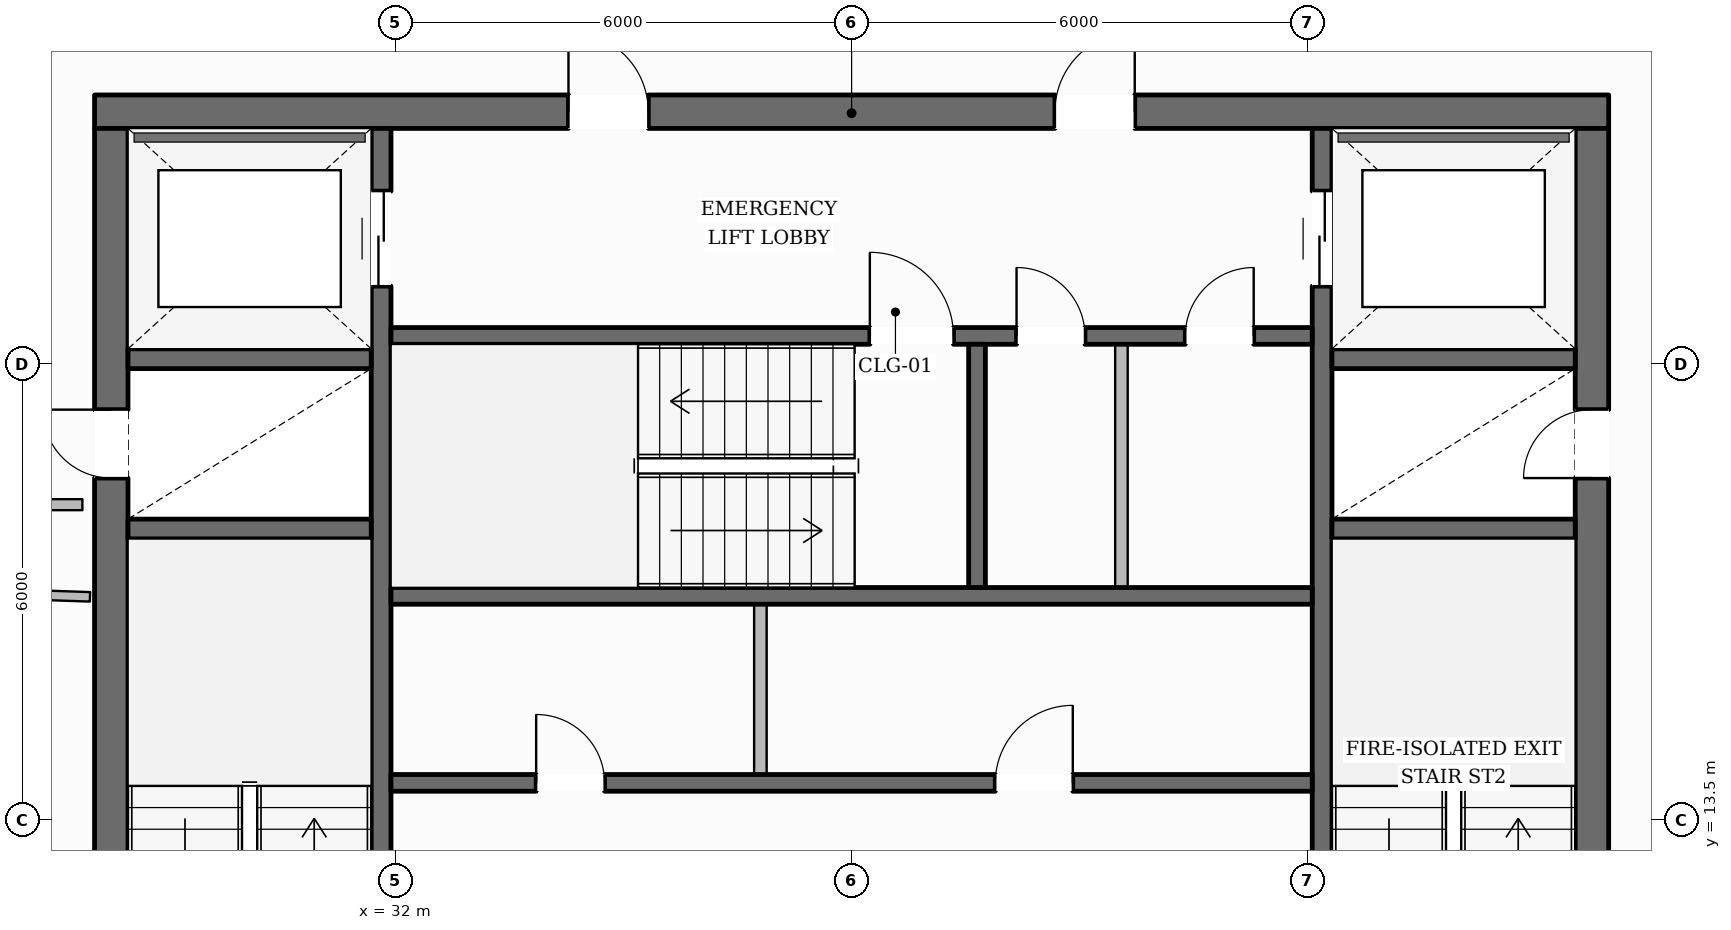
"""IFC4 building model, lengths in metres.
Left out: names, types, materials, properties, quantities, classifications, styles, units other than length and angle.
Written with IfcOpenShell. Run it as: python <this file> out.ifc"""

import sys

from ifc_helpers import new_model, si_unit, direction, frame, frame_2d, origin, place, context, subcontext, project, spatial, rectangle, extrude, element, fill, save


model = new_model("IFC4")
c1 = context("Model", 3, precision=1e-05, world=origin(), true_north=direction((0.0, 1.0)))
c2 = subcontext(c1, "Body", "Model", "MODEL_VIEW")
j1 = project(units=[si_unit("LENGTHUNIT", "METRE"), si_unit("PLANEANGLEUNIT", "RADIAN")], contexts=[c1])
p1 = place(None, origin())
s1 = spatial("IfcSite", under=j1, at=p1, CompositionType="ELEMENT")
p2 = place(p1, origin())
s2 = spatial("IfcBuilding", under=s1, at=p2, CompositionType="ELEMENT")
p3 = place(p2, frame((0.0, 0.0, 203.5)))
s3 = spatial("IfcBuildingStorey", under=s2, at=p3, CompositionType="ELEMENT", Elevation=203.5)
p4 = place(p3, frame((28.04, 22.82, 0.0), z_axis=(0.0, 0.0, 1.0), x_axis=(1.0, 0.0, 0.0)))
e1 = element("IfcWall", 1, at=p4, inside=s3, PredefinedType="SOLIDWALL", context=c2, shape_type="SweptSolid", body=[
    extrude(rectangle(XDim=19.92, YDim=0.44, at=frame_2d((9.96, 0.0))), origin(), (0.0, 0.0, 1.0), 3.6),
])
p5 = place(p4, frame((6.235, 0.0, 0.0)))
e2 = element("IfcOpeningElement", 2, at=p5, cuts=e1, PredefinedType="OPENING", context=c2, shape_type="SweptSolid", body=[
    extrude(rectangle(XDim=1.05, YDim=2.15, at=frame_2d((0.525, 1.075))), frame((0.0, 0.23, 0.0), z_axis=(0.0, -1.0, 0.0), x_axis=(1.0, 0.0, 0.0)), (0.0, 0.0, 1.0), 0.46),
])
p6 = place(p4, frame((12.635, 0.0, 0.0)))
e3 = element("IfcOpeningElement", 3, at=p6, cuts=e1, PredefinedType="OPENING", context=c2, shape_type="SweptSolid", body=[
    extrude(rectangle(XDim=1.05, YDim=2.15, at=frame_2d((0.525, 1.075))), frame((0.0, 0.23, 0.0), z_axis=(0.0, -1.0, 0.0), x_axis=(1.0, 0.0, 0.0)), (0.0, 0.0, 1.0), 0.46),
])
p7 = place(p3, frame((28.26, 9.6, 0.0), z_axis=(0.0, 0.0, 1.0), x_axis=(0.0, 1.0, 0.0)))
e4 = element("IfcWall", 4, at=p7, inside=s3, PredefinedType="SOLIDWALL", context=c2, shape_type="SweptSolid", body=[
    extrude(rectangle(XDim=13.0, YDim=0.44, at=frame_2d((6.5, 0.0))), origin(), (0.0, 0.0, 1.0), 3.6),
])
p8 = place(p7, frame((0.2, 0.0, 0.0)))
e5 = element("IfcOpeningElement", 5, at=p8, cuts=e4, PredefinedType="OPENING", context=c2, shape_type="SweptSolid", body=[
    extrude(rectangle(XDim=1.1, YDim=2.15, at=frame_2d((0.55, 1.075))), frame((0.0, 0.23, 0.0), z_axis=(0.0, -1.0, 0.0), x_axis=(1.0, 0.0, 0.0)), (0.0, 0.0, 1.0), 0.46),
])
p9 = place(p7, frame((8.4, 0.0, 0.0)))
e6 = element("IfcOpeningElement", 6, at=p9, cuts=e4, PredefinedType="OPENING", context=c2, shape_type="SweptSolid", body=[
    extrude(rectangle(XDim=0.9, YDim=2.1, at=frame_2d((0.45, 1.05))), frame((0.0, 0.23, 0.0), z_axis=(0.0, -1.0, 0.0), x_axis=(1.0, 0.0, 0.0)), (0.0, 0.0, 1.0), 0.46),
])
p10 = place(p3, frame((47.74, 9.6, 0.0), z_axis=(0.0, 0.0, 1.0), x_axis=(0.0, 1.0, 0.0)))
e7 = element("IfcWall", 7, at=p10, inside=s3, PredefinedType="SOLIDWALL", context=c2, shape_type="SweptSolid", body=[
    extrude(rectangle(XDim=13.0, YDim=0.44, at=frame_2d((6.5, 0.0))), origin(), (0.0, 0.0, 1.0), 3.6),
])
p11 = place(p10, frame((0.2, 0.0, 0.0)))
e8 = element("IfcOpeningElement", 8, at=p11, cuts=e7, PredefinedType="OPENING", context=c2, shape_type="SweptSolid", body=[
    extrude(rectangle(XDim=1.1, YDim=2.15, at=frame_2d((0.55, 1.075))), frame((0.0, 0.23, 0.0), z_axis=(0.0, -1.0, 0.0), x_axis=(1.0, 0.0, 0.0)), (0.0, 0.0, 1.0), 0.46),
])
p12 = place(p10, frame((8.4, 0.0, 0.0)))
e9 = element("IfcOpeningElement", 9, at=p12, cuts=e7, PredefinedType="OPENING", context=c2, shape_type="SweptSolid", body=[
    extrude(rectangle(XDim=0.9, YDim=2.1, at=frame_2d((0.45, 1.05))), frame((0.0, 0.23, 0.0), z_axis=(0.0, -1.0, 0.0), x_axis=(1.0, 0.0, 0.0)), (0.0, 0.0, 1.0), 0.46),
])
p13 = place(p3, frame((31.81, 9.6, 0.0), z_axis=(0.0, 0.0, 1.0), x_axis=(0.0, 1.0, 0.0)))
e10 = element("IfcWall", 10, at=p13, inside=s3, PredefinedType="SHEAR", context=c2, shape_type="SweptSolid", body=[
    extrude(rectangle(XDim=13.0, YDim=0.26, at=frame_2d((6.5, 0.0))), origin(), (0.0, 0.0, 1.0), 3.6),
])
p14 = place(p13, frame((10.925, 0.0, 0.0)))
e11 = element("IfcOpeningElement", 11, at=p14, cuts=e10, PredefinedType="OPENING", context=c2, shape_type="SweptSolid", body=[
    extrude(rectangle(XDim=1.25, YDim=2.25, at=frame_2d((0.625, 1.125))), frame((0.0, 0.14, 0.0), z_axis=(0.0, -1.0, 0.0), x_axis=(1.0, 0.0, 0.0)), (0.0, 0.0, 1.0), 0.28),
])
p15 = place(p3, frame((44.19, 9.6, 0.0), z_axis=(0.0, 0.0, 1.0), x_axis=(0.0, 1.0, 0.0)))
e12 = element("IfcWall", 12, at=p15, inside=s3, PredefinedType="SHEAR", context=c2, shape_type="SweptSolid", body=[
    extrude(rectangle(XDim=13.0, YDim=0.26, at=frame_2d((6.5, 0.0))), origin(), (0.0, 0.0, 1.0), 3.6),
])
p16 = place(p15, frame((10.925, 0.0, 0.0)))
e13 = element("IfcOpeningElement", 13, at=p16, cuts=e12, PredefinedType="OPENING", context=c2, shape_type="SweptSolid", body=[
    extrude(rectangle(XDim=1.25, YDim=2.25, at=frame_2d((0.625, 1.125))), frame((0.0, 0.14, 0.0), z_axis=(0.0, -1.0, 0.0), x_axis=(1.0, 0.0, 0.0)), (0.0, 0.0, 1.0), 0.28),
])
for number, where, z_axis, x_axis in (
    (14, (28.48, 17.33, 0.0), (0.0, 0.0, 1.0), (1.0, 0.0, 0.0)),
    (15, (28.48, 19.57, 0.0), (0.0, 0.0, 1.0), (1.0, 0.0, 0.0)),
    (16, (44.32, 17.33, 0.0), (0.0, 0.0, 1.0), (1.0, 0.0, 0.0)),
    (17, (44.32, 19.57, 0.0), (0.0, 0.0, 1.0), (1.0, 0.0, 0.0)),
):
    element("IfcWall", number, at=place(p3, frame(where, z_axis=z_axis, x_axis=x_axis)), inside=s3, PredefinedType="SHEAR", context=c2, shape_type="SweptSolid", body=[
        extrude(rectangle(XDim=3.2, YDim=0.26, at=frame_2d((1.6, 0.0))), origin(), (0.0, 0.0, 1.0), 3.6),
    ])
p17 = place(p3, frame((31.94, 19.87, 0.0), z_axis=(0.0, 0.0, 1.0), x_axis=(1.0, 0.0, 0.0)))
e18 = element("IfcWall", 18, at=p17, inside=s3, PredefinedType="SOLIDWALL", context=c2, shape_type="SweptSolid", body=[
    extrude(rectangle(XDim=12.12, YDim=0.22, at=frame_2d((6.06, 0.0))), origin(), (0.0, 0.0, 1.0), 3.6),
])
p18 = place(p17, frame((6.3, 0.0, 0.0)))
e19 = element("IfcOpeningElement", 19, at=p18, cuts=e18, PredefinedType="OPENING", context=c2, shape_type="SweptSolid", body=[
    extrude(rectangle(XDim=1.1, YDim=2.15, at=frame_2d((0.55, 1.075))), frame((0.0, 0.12, 0.0), z_axis=(0.0, -1.0, 0.0), x_axis=(1.0, 0.0, 0.0)), (0.0, 0.0, 1.0), 0.24),
])
p19 = place(p17, frame((8.23, 0.0, 0.0)))
e20 = element("IfcOpeningElement", 20, at=p19, cuts=e18, PredefinedType="OPENING", context=c2, shape_type="SweptSolid", body=[
    extrude(rectangle(XDim=0.9, YDim=2.1, at=frame_2d((0.45, 1.05))), frame((0.0, 0.12, 0.0), z_axis=(0.0, -1.0, 0.0), x_axis=(1.0, 0.0, 0.0)), (0.0, 0.0, 1.0), 0.24),
])
p20 = place(p17, frame((10.45, 0.0, 0.0)))
e21 = element("IfcOpeningElement", 21, at=p20, cuts=e18, PredefinedType="OPENING", context=c2, shape_type="SweptSolid", body=[
    extrude(rectangle(XDim=0.9, YDim=2.1, at=frame_2d((0.45, 1.05))), frame((0.0, 0.12, 0.0), z_axis=(0.0, -1.0, 0.0), x_axis=(1.0, 0.0, 0.0)), (0.0, 0.0, 1.0), 0.24),
])
p21 = place(p3, frame((31.94, 16.45, 0.0), z_axis=(0.0, 0.0, 1.0), x_axis=(1.0, 0.0, 0.0)))
e22 = element("IfcWall", 22, at=p21, inside=s3, PredefinedType="SOLIDWALL", context=c2, shape_type="SweptSolid", body=[
    extrude(rectangle(XDim=12.12, YDim=0.22, at=frame_2d((6.06, 0.0))), origin(), (0.0, 0.0, 1.0), 3.6),
])
p22 = place(p3, frame((39.65, 16.56, 0.0), z_axis=(0.0, 0.0, 1.0), x_axis=(0.0, 1.0, 0.0)))
e23 = element("IfcWall", 23, at=p22, inside=s3, PredefinedType="SOLIDWALL", context=c2, shape_type="SweptSolid", body=[
    extrude(rectangle(XDim=3.2, YDim=0.22, at=frame_2d((1.6, 0.0))), origin(), (0.0, 0.0, 1.0), 3.6),
])
p23 = place(p3, frame((31.94, 13.99, 0.0), z_axis=(0.0, 0.0, 1.0), x_axis=(1.0, 0.0, 0.0)))
e24 = element("IfcWall", 24, at=p23, inside=s3, PredefinedType="SOLIDWALL", context=c2, shape_type="SweptSolid", body=[
    extrude(rectangle(XDim=12.12, YDim=0.22, at=frame_2d((6.06, 0.0))), origin(), (0.0, 0.0, 1.0), 3.6),
])
p24 = place(p23, frame((1.91, 0.0, 0.0)))
e25 = element("IfcOpeningElement", 25, at=p24, cuts=e24, PredefinedType="OPENING", context=c2, shape_type="SweptSolid", body=[
    extrude(rectangle(XDim=0.9, YDim=2.1, at=frame_2d((0.45, 1.05))), frame((0.0, 0.12, 0.0), z_axis=(0.0, -1.0, 0.0), x_axis=(1.0, 0.0, 0.0)), (0.0, 0.0, 1.0), 0.24),
])
p25 = place(p23, frame((7.95, 0.0, 0.0)))
e26 = element("IfcOpeningElement", 26, at=p25, cuts=e24, PredefinedType="OPENING", context=c2, shape_type="SweptSolid", body=[
    extrude(rectangle(XDim=1.02, YDim=2.15, at=frame_2d((0.51, 1.075))), frame((0.0, 0.12, 0.0), z_axis=(0.0, -1.0, 0.0), x_axis=(1.0, 0.0, 0.0)), (0.0, 0.0, 1.0), 0.24),
])
p26 = place(p3, frame((14.405, 11.157, 0.0), z_axis=(0.0, 0.0, 1.0), x_axis=(0.507147779291, 0.861859112593, 0.0)))
e27 = element("IfcWall", 27, at=p26, inside=s3, PredefinedType="STANDARD", context=c2, shape_type="SweptSolid", body=[
    extrude(rectangle(XDim=38.111, YDim=0.35, at=frame_2d((19.056, 0.0))), origin(), (0.0, 0.0, 1.0), 3.132),
])
p27 = place(p26, frame((33.816, 0.0, 0.65)))
e28 = element("IfcOpeningElement", 28, at=p27, cuts=e27, PredefinedType="OPENING", context=c2, shape_type="SweptSolid", body=[
    extrude(rectangle(XDim=1.45, YDim=1.75, at=frame_2d((0.725, 0.875))), frame((0.0, 0.185, 0.0), z_axis=(0.0, -1.0, 0.0), x_axis=(1.0, 0.0, 0.0)), (0.0, 0.0, 1.0), 0.37),
])
p28 = place(p26, frame((27.623, 0.0, 0.65)))
e29 = element("IfcOpeningElement", 29, at=p28, cuts=e27, PredefinedType="OPENING", context=c2, shape_type="SweptSolid", body=[
    extrude(rectangle(XDim=1.45, YDim=1.75, at=frame_2d((0.725, 0.875))), frame((0.0, 0.185, 0.0), z_axis=(0.0, -1.0, 0.0), x_axis=(1.0, 0.0, 0.0)), (0.0, 0.0, 1.0), 0.37),
])
p29 = place(p26, frame((15.239, 0.0, 0.65)))
e30 = element("IfcOpeningElement", 30, at=p29, cuts=e27, PredefinedType="OPENING", context=c2, shape_type="SweptSolid", body=[
    extrude(rectangle(XDim=1.45, YDim=1.75, at=frame_2d((0.725, 0.875))), frame((0.0, 0.185, 0.0), z_axis=(0.0, -1.0, 0.0), x_axis=(1.0, 0.0, 0.0)), (0.0, 0.0, 1.0), 0.37),
])
p30 = place(p26, frame((9.046, 0.0, 0.65)))
e31 = element("IfcOpeningElement", 31, at=p30, cuts=e27, PredefinedType="OPENING", context=c2, shape_type="SweptSolid", body=[
    extrude(rectangle(XDim=1.45, YDim=1.75, at=frame_2d((0.725, 0.875))), frame((0.0, 0.185, 0.0), z_axis=(0.0, -1.0, 0.0), x_axis=(1.0, 0.0, 0.0)), (0.0, 0.0, 1.0), 0.37),
])
p31 = place(p26, frame((2.854, 0.0, 0.65)))
e32 = element("IfcOpeningElement", 32, at=p31, cuts=e27, PredefinedType="OPENING", context=c2, shape_type="SweptSolid", body=[
    extrude(rectangle(XDim=1.45, YDim=1.75, at=frame_2d((0.725, 0.875))), frame((0.0, 0.185, 0.0), z_axis=(0.0, -1.0, 0.0), x_axis=(1.0, 0.0, 0.0)), (0.0, 0.0, 1.0), 0.37),
])
p32 = place(p3, frame((42.267, 44.004, 0.0), z_axis=(0.0, 0.0, 1.0), x_axis=(0.507147779291, -0.861859112593, 0.0)))
e33 = element("IfcWall", 33, at=p32, inside=s3, PredefinedType="STANDARD", context=c2, shape_type="SweptSolid", body=[
    extrude(rectangle(XDim=38.111, YDim=0.35, at=frame_2d((19.056, 0.0))), origin(), (0.0, 0.0, 1.0), 3.132),
])
p33 = place(p32, frame((33.808, 0.0, 0.65)))
e34 = element("IfcOpeningElement", 34, at=p33, cuts=e33, PredefinedType="OPENING", context=c2, shape_type="SweptSolid", body=[
    extrude(rectangle(XDim=1.45, YDim=1.75, at=frame_2d((0.725, 0.875))), frame((0.0, 0.185, 0.0), z_axis=(0.0, -1.0, 0.0), x_axis=(1.0, 0.0, 0.0)), (0.0, 0.0, 1.0), 0.37),
])
p34 = place(p32, frame((27.615, 0.0, 0.65)))
e35 = element("IfcOpeningElement", 35, at=p34, cuts=e33, PredefinedType="OPENING", context=c2, shape_type="SweptSolid", body=[
    extrude(rectangle(XDim=1.45, YDim=1.75, at=frame_2d((0.725, 0.875))), frame((0.0, 0.185, 0.0), z_axis=(0.0, -1.0, 0.0), x_axis=(1.0, 0.0, 0.0)), (0.0, 0.0, 1.0), 0.37),
])
p35 = place(p32, frame((15.231, 0.0, 0.65)))
e36 = element("IfcOpeningElement", 36, at=p35, cuts=e33, PredefinedType="OPENING", context=c2, shape_type="SweptSolid", body=[
    extrude(rectangle(XDim=1.45, YDim=1.75, at=frame_2d((0.725, 0.875))), frame((0.0, 0.185, 0.0), z_axis=(0.0, -1.0, 0.0), x_axis=(1.0, 0.0, 0.0)), (0.0, 0.0, 1.0), 0.37),
])
p36 = place(p32, frame((9.038, 0.0, 0.65)))
e37 = element("IfcOpeningElement", 37, at=p36, cuts=e33, PredefinedType="OPENING", context=c2, shape_type="SweptSolid", body=[
    extrude(rectangle(XDim=1.45, YDim=1.75, at=frame_2d((0.725, 0.875))), frame((0.0, 0.185, 0.0), z_axis=(0.0, -1.0, 0.0), x_axis=(1.0, 0.0, 0.0)), (0.0, 0.0, 1.0), 0.37),
])
p37 = place(p32, frame((2.846, 0.0, 0.65)))
e38 = element("IfcOpeningElement", 38, at=p37, cuts=e33, PredefinedType="OPENING", context=c2, shape_type="SweptSolid", body=[
    extrude(rectangle(XDim=1.45, YDim=1.75, at=frame_2d((0.725, 0.875))), frame((0.0, 0.185, 0.0), z_axis=(0.0, -1.0, 0.0), x_axis=(1.0, 0.0, 0.0)), (0.0, 0.0, 1.0), 0.37),
])
p38 = place(p3, frame((36.8, 14.1, 0.0), z_axis=(0.0, 0.0, 1.0), x_axis=(0.0, 1.0, 0.0)))
e39 = element("IfcWall", 39, at=p38, inside=s3, PredefinedType="PARTITIONING", context=c2, shape_type="SweptSolid", body=[
    extrude(rectangle(XDim=2.24, YDim=0.165, at=frame_2d((1.12, 0.0))), origin(), (0.0, 0.0, 1.0), 3.6),
])
p39 = place(p3, frame((41.55, 16.56, 0.0), z_axis=(0.0, 0.0, 1.0), x_axis=(0.0, 1.0, 0.0)))
e40 = element("IfcWall", 40, at=p39, inside=s3, PredefinedType="PARTITIONING", context=c2, shape_type="SweptSolid", body=[
    extrude(rectangle(XDim=3.2, YDim=0.165, at=frame_2d((1.6, 0.0))), origin(), (0.0, 0.0, 1.0), 3.6),
])
p40 = place(p3, frame((27.88, 17.65, 0.0), z_axis=(0.0, 0.0, 1.0), x_axis=(-1.0, 0.0, 0.0)))
e41 = element("IfcWall", 41, at=p40, inside=s3, PredefinedType="PARTITIONING", context=c2, shape_type="SweptSolid", body=[
    extrude(rectangle(XDim=1.82, YDim=0.145, at=frame_2d((0.91, 0.0))), origin(), (0.0, 0.0, 1.0), 3.6),
])
p41 = place(p3, frame((27.98, 16.438, 0.0), z_axis=(0.0, 0.0, 1.0), x_axis=(-0.999433600002, 0.033652328114, 0.0)))
e42 = element("IfcWall", 42, at=p41, inside=s3, PredefinedType="PARTITIONING", context=c2, shape_type="SweptSolid", body=[
    extrude(rectangle(XDim=9.634, YDim=0.125, at=frame_2d((4.817, 0.0))), origin(), (0.0, 0.0, 1.0), 3.141),
])
p42 = place(p3, frame((28.541, 31.023, 0.0), z_axis=(0.0, 0.0, 1.0), x_axis=(-0.449722790535, -0.893168187786, 0.0)))
e43 = element("IfcWall", 43, at=p42, inside=s3, PredefinedType="PARTITIONING", context=c2, shape_type="SweptSolid", body=[
    extrude(rectangle(XDim=16.062, YDim=0.125, at=frame_2d((8.031, 0.0))), origin(), (0.0, 0.0, 1.0), 3.339),
])
p43 = place(p42, frame((7.548, 0.0, 0.0)))
e44 = element("IfcOpeningElement", 44, at=p43, cuts=e43, PredefinedType="OPENING", context=c2, shape_type="SweptSolid", body=[
    extrude(rectangle(XDim=0.98, YDim=2.15, at=frame_2d((0.49, 1.075))), frame((0.0, 0.073, 0.0), z_axis=(0.0, -1.0, 0.0), x_axis=(1.0, 0.0, 0.0)), (0.0, 0.0, 1.0), 0.145),
])
p44 = place(p18, origin())
e45 = element("IfcDoor", 45, at=p44, inside=s3, OperationType="SINGLE_SWING_LEFT", PredefinedType="DOOR", context=c2, shape_type="SweptSolid", body=[
    extrude(rectangle(XDim=1.1, YDim=2.15, at=frame_2d((0.55, 1.075))), frame((0.0, 0.025, 0.0), z_axis=(0.0, -1.0, 0.0), x_axis=(1.0, 0.0, 0.0)), (0.0, 0.0, 1.0), 0.05),
])
fill(e19, e45)
p45 = place(p9, origin())
e46 = element("IfcDoor", 46, at=p45, inside=s3, OperationType="SINGLE_SWING_RIGHT", PredefinedType="DOOR", context=c2, shape_type="SweptSolid", body=[
    extrude(rectangle(XDim=0.9, YDim=2.1, at=frame_2d((0.45, 1.05))), frame((0.0, 0.025, 0.0), z_axis=(0.0, -1.0, 0.0), x_axis=(1.0, 0.0, 0.0)), (0.0, 0.0, 1.0), 0.05),
])
fill(e6, e46)
p46 = place(p12, origin())
e47 = element("IfcDoor", 47, at=p46, inside=s3, OperationType="SINGLE_SWING_LEFT", PredefinedType="DOOR", context=c2, shape_type="SweptSolid", body=[
    extrude(rectangle(XDim=0.9, YDim=2.1, at=frame_2d((0.45, 1.05))), frame((0.0, 0.025, 0.0), z_axis=(0.0, -1.0, 0.0), x_axis=(1.0, 0.0, 0.0)), (0.0, 0.0, 1.0), 0.05),
])
fill(e9, e47)
p47 = place(p5, origin())
e48 = element("IfcDoor", 48, at=p47, inside=s3, OperationType="SINGLE_SWING_LEFT", PredefinedType="DOOR", context=c2, shape_type="SweptSolid", body=[
    extrude(rectangle(XDim=1.05, YDim=2.15, at=frame_2d((0.525, 1.075))), frame((0.0, 0.025, 0.0), z_axis=(0.0, -1.0, 0.0), x_axis=(1.0, 0.0, 0.0)), (0.0, 0.0, 1.0), 0.05),
])
fill(e2, e48)
p48 = place(p6, origin())
e49 = element("IfcDoor", 49, at=p48, inside=s3, OperationType="SINGLE_SWING_RIGHT", PredefinedType="DOOR", context=c2, shape_type="SweptSolid", body=[
    extrude(rectangle(XDim=1.05, YDim=2.15, at=frame_2d((0.525, 1.075))), frame((0.0, 0.025, 0.0), z_axis=(0.0, -1.0, 0.0), x_axis=(1.0, 0.0, 0.0)), (0.0, 0.0, 1.0), 0.05),
])
fill(e3, e49)
p49 = place(p14, origin())
e50 = element("IfcDoor", 50, at=p49, inside=s3, OperationType="DOUBLE_DOOR_SLIDING", PredefinedType="DOOR", context=c2, shape_type="SweptSolid", body=[
    extrude(rectangle(XDim=1.25, YDim=2.25, at=frame_2d((0.625, 1.125))), frame((0.0, 0.025, 0.0), z_axis=(0.0, -1.0, 0.0), x_axis=(1.0, 0.0, 0.0)), (0.0, 0.0, 1.0), 0.05),
])
fill(e11, e50)
p50 = place(p16, origin())
e51 = element("IfcDoor", 51, at=p50, inside=s3, OperationType="DOUBLE_DOOR_SLIDING", PredefinedType="DOOR", context=c2, shape_type="SweptSolid", body=[
    extrude(rectangle(XDim=1.25, YDim=2.25, at=frame_2d((0.625, 1.125))), frame((0.0, 0.025, 0.0), z_axis=(0.0, -1.0, 0.0), x_axis=(1.0, 0.0, 0.0)), (0.0, 0.0, 1.0), 0.05),
])
fill(e13, e51)
p51 = place(p24, origin())
e52 = element("IfcDoor", 52, at=p51, inside=s3, OperationType="SINGLE_SWING_LEFT", PredefinedType="DOOR", context=c2, shape_type="SweptSolid", body=[
    extrude(rectangle(XDim=0.9, YDim=2.1, at=frame_2d((0.45, 1.05))), frame((0.0, 0.025, 0.0), z_axis=(0.0, -1.0, 0.0), x_axis=(1.0, 0.0, 0.0)), (0.0, 0.0, 1.0), 0.05),
])
fill(e25, e52)
p52 = place(p25, origin())
e53 = element("IfcDoor", 53, at=p52, inside=s3, OperationType="SINGLE_SWING_RIGHT", PredefinedType="DOOR", context=c2, shape_type="SweptSolid", body=[
    extrude(rectangle(XDim=1.02, YDim=2.15, at=frame_2d((0.51, 1.075))), frame((0.0, 0.025, 0.0), z_axis=(0.0, -1.0, 0.0), x_axis=(1.0, 0.0, 0.0)), (0.0, 0.0, 1.0), 0.05),
])
fill(e26, e53)
p53 = place(p19, origin())
e54 = element("IfcDoor", 54, at=p53, inside=s3, OperationType="SINGLE_SWING_LEFT", PredefinedType="DOOR", context=c2, shape_type="SweptSolid", body=[
    extrude(rectangle(XDim=0.9, YDim=2.1, at=frame_2d((0.45, 1.05))), frame((0.0, 0.025, 0.0), z_axis=(0.0, -1.0, 0.0), x_axis=(1.0, 0.0, 0.0)), (0.0, 0.0, 1.0), 0.05),
])
fill(e20, e54)
p54 = place(p20, origin())
e55 = element("IfcDoor", 55, at=p54, inside=s3, OperationType="SINGLE_SWING_RIGHT", PredefinedType="DOOR", context=c2, shape_type="SweptSolid", body=[
    extrude(rectangle(XDim=0.9, YDim=2.1, at=frame_2d((0.45, 1.05))), frame((0.0, 0.025, 0.0), z_axis=(0.0, -1.0, 0.0), x_axis=(1.0, 0.0, 0.0)), (0.0, 0.0, 1.0), 0.05),
])
fill(e21, e55)
save(model, sys.argv[1])
